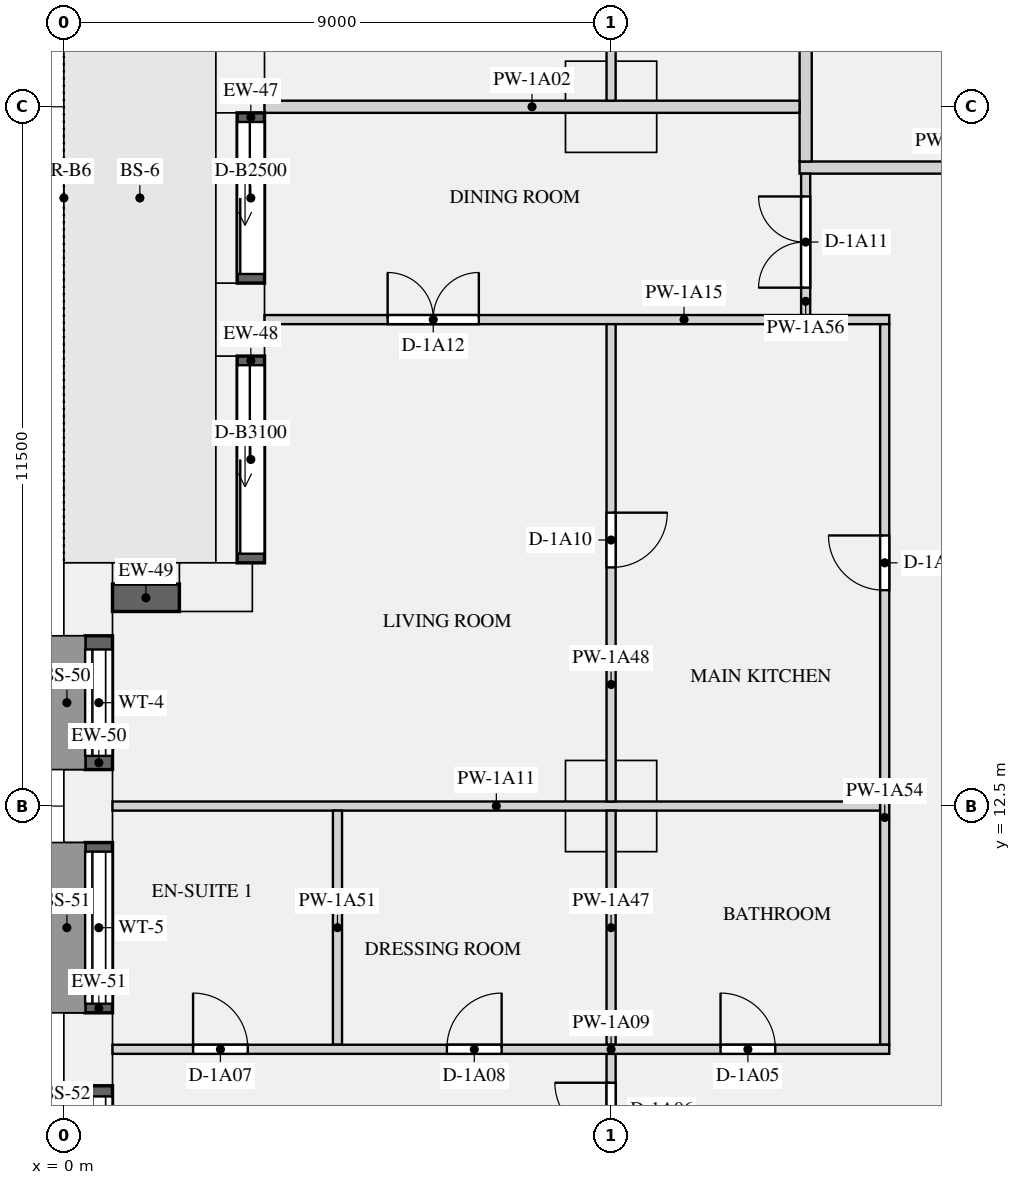
"""IFC4 building model, lengths in metres.
Left out: names, types, materials, properties, quantities, classifications, styles, units other than length and angle.
Written with IfcOpenShell. Run it as: python <this file> out.ifc"""

import sys

from ifc_helpers import new_model, si_unit, direction, frame, frame_2d, origin, origin_2d, place, context, subcontext, project, spatial, rectangle, extrude, element, fill, save


model = new_model("IFC4")
c1 = context("Model", 3, precision=1e-05, world=origin(), true_north=direction((0.0, 1.0)))
c2 = subcontext(c1, "Body", "Model", "MODEL_VIEW")
j1 = project(units=[si_unit("LENGTHUNIT", "METRE"), si_unit("PLANEANGLEUNIT", "RADIAN")], contexts=[c1])
p1 = place(None, origin())
s1 = spatial("IfcSite", under=j1, at=p1, CompositionType="ELEMENT")
p2 = place(p1, origin())
s2 = spatial("IfcBuilding", under=s1, at=p2, CompositionType="ELEMENT")
p3 = place(p2, frame((0.0, 0.0, 19.5)))
s3 = spatial("IfcBuildingStorey", under=s2, at=p3, CompositionType="ELEMENT", Elevation=19.5)
for number, where, z_axis, x_axis in (
    (1, (2.9, 24.5, -0.32), (0.0, 0.0, 1.0), (0.0, -1.0, 0.0)),
    (2, (2.9, 20.5, -0.32), (0.0, 0.0, 1.0), (0.0, -1.0, 0.0)),
):
    element("IfcColumn", number, at=place(p3, frame(where, z_axis=z_axis, x_axis=x_axis)), inside=s3, PredefinedType="USERDEFINED", context=c2, shape_type="SweptSolid", body=[
        extrude(rectangle(XDim=1.2, YDim=0.8, at=origin_2d()), origin(), (0.0, 0.0, 1.0), 3.47),
    ])
for number, where, z_axis, x_axis in (
    (3, (2.5, 16.1, 0.0), (0.0, 0.0, 1.0), (-1.0, 0.0, 0.0)),
    (4, (0.4, 15.9, 0.0), (0.0, 0.0, 1.0), (0.0, -1.0, 0.0)),
):
    element("IfcColumn", number, at=place(p3, frame(where, z_axis=z_axis, x_axis=x_axis)), inside=s3, PredefinedType="USERDEFINED", context=c2, shape_type="SweptSolid", body=[
        extrude(rectangle(XDim=1.2, YDim=0.8, at=origin_2d()), origin(), (0.0, 0.0, 1.0), 3.15),
    ])
for number, where, z_axis, x_axis in (
    (5, (0.4, 12.5, -0.32), (0.0, 0.0, 1.0), (0.0, -1.0, 0.0)),
    (6, (0.4, 8.5, -0.32), (0.0, 0.0, 1.0), (0.0, -1.0, 0.0)),
):
    element("IfcColumn", number, at=place(p3, frame(where, z_axis=z_axis, x_axis=x_axis)), inside=s3, PredefinedType="USERDEFINED", context=c2, shape_type="SweptSolid", body=[
        extrude(rectangle(XDim=1.2, YDim=0.8, at=origin_2d()), origin(), (0.0, 0.0, 1.0), 3.47),
    ])
for number, where, z_axis, x_axis in (
    (7, (9.0, 24.0, 0.0), (0.0, 0.0, 1.0), (1.0, 0.0, 0.0)),
    (8, (9.0, 12.5, 0.0), (0.0, 0.0, 1.0), (1.0, 0.0, 0.0)),
):
    element("IfcColumn", number, at=place(p3, frame(where, z_axis=z_axis, x_axis=x_axis)), inside=s3, PredefinedType="COLUMN", context=c2, shape_type="SweptSolid", body=[
        extrude(rectangle(XDim=1.5, YDim=1.5, at=origin_2d()), origin(), (0.0, 0.0, 1.0), 3.15),
    ])
p4 = place(p3, frame((3.075, 23.9, 0.0), z_axis=(0.0, 0.0, 1.0), x_axis=(0.0, -1.0, 0.0)))
e9 = element("IfcWall", 9, at=p4, inside=s3, PredefinedType="SOLIDWALL", context=c2, shape_type="SweptSolid", body=[
    extrude(rectangle(XDim=2.8, YDim=0.45, at=frame_2d((1.4, 0.0))), origin(), (0.0, 0.0, 1.0), 2.83),
])
p5 = place(p4, frame((0.15, 0.0, 0.0)))
e10 = element("IfcOpeningElement", 10, at=p5, cuts=e9, PredefinedType="OPENING", context=c2, shape_type="SweptSolid", body=[
    extrude(rectangle(XDim=2.5, YDim=2.3, at=frame_2d((1.25, 1.15))), frame((0.0, 0.235, 0.0), z_axis=(0.0, -1.0, 0.0), x_axis=(1.0, 0.0, 0.0)), (0.0, 0.0, 1.0), 0.47),
])
p6 = place(p3, frame((3.075, 19.9, 0.0), z_axis=(0.0, 0.0, 1.0), x_axis=(0.0, -1.0, 0.0)))
e11 = element("IfcWall", 11, at=p6, inside=s3, PredefinedType="SOLIDWALL", context=c2, shape_type="SweptSolid", body=[
    extrude(rectangle(XDim=3.4, YDim=0.45, at=frame_2d((1.7, 0.0))), origin(), (0.0, 0.0, 1.0), 2.83),
])
p7 = place(p6, frame((0.15, 0.0, 0.0)))
e12 = element("IfcOpeningElement", 12, at=p7, cuts=e11, PredefinedType="OPENING", context=c2, shape_type="SweptSolid", body=[
    extrude(rectangle(XDim=3.1, YDim=2.3, at=frame_2d((1.55, 1.15))), frame((0.0, 0.235, 0.0), z_axis=(0.0, -1.0, 0.0), x_axis=(1.0, 0.0, 0.0)), (0.0, 0.0, 1.0), 0.47),
])
p8 = place(p3, frame((1.9, 15.925, 0.9), z_axis=(0.0, 0.0, 1.0), x_axis=(-1.0, 0.0, 0.0)))
e13 = element("IfcWall", 13, at=p8, inside=s3, PredefinedType="SOLIDWALL", context=c2, shape_type="SweptSolid", body=[
    extrude(rectangle(XDim=1.1, YDim=0.45, at=frame_2d((0.55, 0.0))), origin(), (0.0, 0.0, 1.0), 1.93),
])
p9 = place(p3, frame((0.575, 15.3, 0.9), z_axis=(0.0, 0.0, 1.0), x_axis=(0.0, -1.0, 0.0)))
e14 = element("IfcWall", 14, at=p9, inside=s3, PredefinedType="SOLIDWALL", context=c2, shape_type="SweptSolid", body=[
    extrude(rectangle(XDim=2.2, YDim=0.45, at=frame_2d((1.1, 0.0))), origin(), (0.0, 0.0, 1.0), 1.93),
])
p10 = place(p9, frame((0.225, 0.0, 0.15)))
e15 = element("IfcOpeningElement", 15, at=p10, cuts=e14, PredefinedType="OPENING", context=c2, shape_type="SweptSolid", body=[
    extrude(rectangle(XDim=1.75, YDim=1.5, at=frame_2d((0.875, 0.75))), frame((0.0, 0.235, 0.0), z_axis=(0.0, -1.0, 0.0), x_axis=(1.0, 0.0, 0.0)), (0.0, 0.0, 1.0), 0.47),
])
p11 = place(p3, frame((0.575, 11.9, 0.9), z_axis=(0.0, 0.0, 1.0), x_axis=(0.0, -1.0, 0.0)))
e16 = element("IfcWall", 16, at=p11, inside=s3, PredefinedType="SOLIDWALL", context=c2, shape_type="SweptSolid", body=[
    extrude(rectangle(XDim=2.8, YDim=0.45, at=frame_2d((1.4, 0.0))), origin(), (0.0, 0.0, 1.0), 1.93),
])
p12 = place(p11, frame((0.15, 0.0, 0.15)))
e17 = element("IfcOpeningElement", 17, at=p12, cuts=e16, PredefinedType="OPENING", context=c2, shape_type="SweptSolid", body=[
    extrude(rectangle(XDim=2.5, YDim=1.5, at=frame_2d((1.25, 0.75))), frame((0.0, 0.235, 0.0), z_axis=(0.0, -1.0, 0.0), x_axis=(1.0, 0.0, 0.0)), (0.0, 0.0, 1.0), 0.47),
])
p13 = place(p3, frame((0.575, 7.9, 0.9), z_axis=(0.0, 0.0, 1.0), x_axis=(0.0, -1.0, 0.0)))
e18 = element("IfcWall", 18, at=p13, inside=s3, PredefinedType="SOLIDWALL", context=c2, shape_type="SweptSolid", body=[
    extrude(rectangle(XDim=2.6, YDim=0.45, at=frame_2d((1.3, 0.0))), origin(), (0.0, 0.0, 1.0), 1.93),
])
p14 = place(p13, frame((0.175, 0.0, 0.15)))
e19 = element("IfcOpeningElement", 19, at=p14, cuts=e18, PredefinedType="OPENING", context=c2, shape_type="SweptSolid", body=[
    extrude(rectangle(XDim=2.25, YDim=1.5, at=frame_2d((1.125, 0.75))), frame((0.0, 0.235, 0.0), z_axis=(0.0, -1.0, 0.0), x_axis=(1.0, 0.0, 0.0)), (0.0, 0.0, 1.0), 0.47),
])
p15 = place(p3, frame((12.1, 23.0, 0.0), z_axis=(0.0, 0.0, 1.0), x_axis=(1.0, 0.0, 0.0)))
e20 = element("IfcWall", 20, at=p15, inside=s3, PredefinedType="PARTITIONING", context=c2, shape_type="SweptSolid", body=[
    extrude(rectangle(XDim=5.0, YDim=0.2, at=frame_2d((2.5, 0.0))), origin(), (0.0, 0.0, 1.0), 2.83),
])
p16 = place(p3, frame((12.2, 23.1, 0.0), z_axis=(0.0, 0.0, 1.0), x_axis=(0.0, 1.0, 0.0)))
e21 = element("IfcWall", 21, at=p16, inside=s3, PredefinedType="PARTITIONING", context=c2, shape_type="SweptSolid", body=[
    extrude(rectangle(XDim=3.9, YDim=0.2, at=frame_2d((1.95, 0.0))), origin(), (0.0, 0.0, 1.0), 2.83),
])
p17 = place(p3, frame((3.3, 24.0, 0.0), z_axis=(0.0, 0.0, 1.0), x_axis=(1.0, 0.0, 0.0)))
e22 = element("IfcWall", 22, at=p17, inside=s3, PredefinedType="PARTITIONING", context=c2, shape_type="SweptSolid", body=[
    extrude(rectangle(XDim=8.8, YDim=0.2, at=frame_2d((4.4, 0.0))), origin(), (0.0, 0.0, 1.0), 2.83),
])
p18 = place(p3, frame((0.8, 8.5, 0.0), z_axis=(0.0, 0.0, 1.0), x_axis=(1.0, 0.0, 0.0)))
e23 = element("IfcWall", 23, at=p18, inside=s3, PredefinedType="PARTITIONING", context=c2, shape_type="SweptSolid", body=[
    extrude(rectangle(XDim=12.775, YDim=0.15, at=frame_2d((6.387, 0.0))), origin(), (0.0, 0.0, 1.0), 2.83),
])
p19 = place(p18, frame((10.0, 0.0, 0.0)))
e24 = element("IfcOpeningElement", 24, at=p19, cuts=e23, PredefinedType="OPENING", context=c2, shape_type="SweptSolid", body=[
    extrude(rectangle(XDim=0.9, YDim=2.1, at=frame_2d((0.45, 1.05))), frame((0.0, 0.085, 0.0), z_axis=(0.0, -1.0, 0.0), x_axis=(1.0, 0.0, 0.0)), (0.0, 0.0, 1.0), 0.17),
])
p20 = place(p18, frame((1.325, 0.0, 0.0)))
e25 = element("IfcOpeningElement", 25, at=p20, cuts=e23, PredefinedType="OPENING", context=c2, shape_type="SweptSolid", body=[
    extrude(rectangle(XDim=0.9, YDim=2.1, at=frame_2d((0.45, 1.05))), frame((0.0, 0.085, 0.0), z_axis=(0.0, -1.0, 0.0), x_axis=(1.0, 0.0, 0.0)), (0.0, 0.0, 1.0), 0.17),
])
p21 = place(p18, frame((5.5, 0.0, 0.0)))
e26 = element("IfcOpeningElement", 26, at=p21, cuts=e23, PredefinedType="OPENING", context=c2, shape_type="SweptSolid", body=[
    extrude(rectangle(XDim=0.9, YDim=2.1, at=frame_2d((0.45, 1.05))), frame((0.0, 0.085, 0.0), z_axis=(0.0, -1.0, 0.0), x_axis=(1.0, 0.0, 0.0)), (0.0, 0.0, 1.0), 0.17),
])
p22 = place(p3, frame((0.8, 12.5, 0.0), z_axis=(0.0, 0.0, 1.0), x_axis=(1.0, 0.0, 0.0)))
e27 = element("IfcWall", 27, at=p22, inside=s3, PredefinedType="PARTITIONING", context=c2, shape_type="SweptSolid", body=[
    extrude(rectangle(XDim=12.625, YDim=0.15, at=frame_2d((6.312, 0.0))), origin(), (0.0, 0.0, 1.0), 2.83),
])
p23 = place(p3, frame((3.3, 20.5, 0.0), z_axis=(0.0, 0.0, 1.0), x_axis=(1.0, 0.0, 0.0)))
e28 = element("IfcWall", 28, at=p23, inside=s3, PredefinedType="PARTITIONING", context=c2, shape_type="SweptSolid", body=[
    extrude(rectangle(XDim=10.275, YDim=0.15, at=frame_2d((5.137, 0.0))), origin(), (0.0, 0.0, 1.0), 2.83),
])
p24 = place(p23, frame((2.025, 0.0, 0.0)))
e29 = element("IfcOpeningElement", 29, at=p24, cuts=e28, PredefinedType="OPENING", context=c2, shape_type="SweptSolid", body=[
    extrude(rectangle(XDim=1.5, YDim=2.1, at=frame_2d((0.75, 1.05))), frame((0.0, 0.085, 0.0), z_axis=(0.0, -1.0, 0.0), x_axis=(1.0, 0.0, 0.0)), (0.0, 0.0, 1.0), 0.17),
])
p25 = place(p3, frame((9.0, 0.8, 0.0), z_axis=(0.0, 0.0, 1.0), x_axis=(0.0, 1.0, 0.0)))
e30 = element("IfcWall", 30, at=p25, inside=s3, PredefinedType="PARTITIONING", context=c2, shape_type="SweptSolid", body=[
    extrude(rectangle(XDim=7.625, YDim=0.15, at=frame_2d((3.812, 0.0))), origin(), (0.0, 0.0, 1.0), 2.83),
])
p26 = place(p25, frame((6.25, 0.0, 0.0)))
e31 = element("IfcOpeningElement", 31, at=p26, cuts=e30, PredefinedType="OPENING", context=c2, shape_type="SweptSolid", body=[
    extrude(rectangle(XDim=0.9, YDim=2.1, at=frame_2d((0.45, 1.05))), frame((0.0, 0.085, 0.0), z_axis=(0.0, -1.0, 0.0), x_axis=(1.0, 0.0, 0.0)), (0.0, 0.0, 1.0), 0.17),
])
p27 = place(p3, frame((9.0, 8.575, 0.0), z_axis=(0.0, 0.0, 1.0), x_axis=(0.0, 1.0, 0.0)))
e32 = element("IfcWall", 32, at=p27, inside=s3, PredefinedType="PARTITIONING", context=c2, shape_type="SweptSolid", body=[
    extrude(rectangle(XDim=3.85, YDim=0.15, at=frame_2d((1.925, 0.0))), origin(), (0.0, 0.0, 1.0), 2.83),
])
p28 = place(p3, frame((9.0, 12.575, 0.0), z_axis=(0.0, 0.0, 1.0), x_axis=(0.0, 1.0, 0.0)))
e33 = element("IfcWall", 33, at=p28, inside=s3, PredefinedType="PARTITIONING", context=c2, shape_type="SweptSolid", body=[
    extrude(rectangle(XDim=7.85, YDim=0.15, at=frame_2d((3.925, 0.0))), origin(), (0.0, 0.0, 1.0), 2.83),
])
p29 = place(p28, frame((3.85, 0.0, 0.0)))
e34 = element("IfcOpeningElement", 34, at=p29, cuts=e33, PredefinedType="OPENING", context=c2, shape_type="SweptSolid", body=[
    extrude(rectangle(XDim=0.9, YDim=2.1, at=frame_2d((0.45, 1.05))), frame((0.0, 0.085, 0.0), z_axis=(0.0, -1.0, 0.0), x_axis=(1.0, 0.0, 0.0)), (0.0, 0.0, 1.0), 0.17),
])
p30 = place(p3, frame((9.0, 24.1, 0.0), z_axis=(0.0, 0.0, 1.0), x_axis=(0.0, 1.0, 0.0)))
e35 = element("IfcWall", 35, at=p30, inside=s3, PredefinedType="PARTITIONING", context=c2, shape_type="SweptSolid", body=[
    extrude(rectangle(XDim=12.075, YDim=0.15, at=frame_2d((6.038, 0.0))), origin(), (0.0, 0.0, 1.0), 2.83),
])
p31 = place(p30, frame((4.012, 0.0, 0.0)))
e36 = element("IfcOpeningElement", 36, at=p31, cuts=e35, PredefinedType="OPENING", context=c2, shape_type="SweptSolid", body=[
    extrude(rectangle(XDim=0.9, YDim=2.1, at=frame_2d((0.45, 1.05))), frame((0.0, 0.085, 0.0), z_axis=(0.0, -1.0, 0.0), x_axis=(1.0, 0.0, 0.0)), (0.0, 0.0, 1.0), 0.17),
])
p32 = place(p30, frame((9.012, 0.0, 0.0)))
e37 = element("IfcOpeningElement", 37, at=p32, cuts=e35, PredefinedType="OPENING", context=c2, shape_type="SweptSolid", body=[
    extrude(rectangle(XDim=0.9, YDim=2.1, at=frame_2d((0.45, 1.05))), frame((0.0, 0.085, 0.0), z_axis=(0.0, -1.0, 0.0), x_axis=(1.0, 0.0, 0.0)), (0.0, 0.0, 1.0), 0.17),
])
p33 = place(p3, frame((4.5, 8.575, 0.0), z_axis=(0.0, 0.0, 1.0), x_axis=(0.0, 1.0, 0.0)))
e38 = element("IfcWall", 38, at=p33, inside=s3, PredefinedType="PARTITIONING", context=c2, shape_type="SweptSolid", body=[
    extrude(rectangle(XDim=3.85, YDim=0.15, at=frame_2d((1.925, 0.0))), origin(), (0.0, 0.0, 1.0), 2.83),
])
p34 = place(p3, frame((13.5, 8.575, 0.0), z_axis=(0.0, 0.0, 1.0), x_axis=(0.0, 1.0, 0.0)))
e39 = element("IfcWall", 39, at=p34, inside=s3, PredefinedType="PARTITIONING", context=c2, shape_type="SweptSolid", body=[
    extrude(rectangle(XDim=11.85, YDim=0.15, at=frame_2d((5.925, 0.0))), origin(), (0.0, 0.0, 1.0), 2.83),
])
p35 = place(p34, frame((7.475, 0.0, 0.0)))
e40 = element("IfcOpeningElement", 40, at=p35, cuts=e39, PredefinedType="OPENING", context=c2, shape_type="SweptSolid", body=[
    extrude(rectangle(XDim=0.9, YDim=2.1, at=frame_2d((0.45, 1.05))), frame((0.0, 0.085, 0.0), z_axis=(0.0, -1.0, 0.0), x_axis=(1.0, 0.0, 0.0)), (0.0, 0.0, 1.0), 0.17),
])
p36 = place(p3, frame((12.2, 20.575, 0.0), z_axis=(0.0, 0.0, 1.0), x_axis=(0.0, 1.0, 0.0)))
e41 = element("IfcWall", 41, at=p36, inside=s3, PredefinedType="PARTITIONING", context=c2, shape_type="SweptSolid", body=[
    extrude(rectangle(XDim=2.325, YDim=0.15, at=frame_2d((1.163, 0.0))), origin(), (0.0, 0.0, 1.0), 2.83),
])
p37 = place(p36, frame((0.45, 0.0, 0.0)))
e42 = element("IfcOpeningElement", 42, at=p37, cuts=e41, PredefinedType="OPENING", context=c2, shape_type="SweptSolid", body=[
    extrude(rectangle(XDim=1.5, YDim=2.1, at=frame_2d((0.75, 1.05))), frame((0.0, 0.085, 0.0), z_axis=(0.0, -1.0, 0.0), x_axis=(1.0, 0.0, 0.0)), (0.0, 0.0, 1.0), 0.17),
])
p38 = place(p5, origin())
e43 = element("IfcDoor", 43, at=p38, inside=s3, OperationType="SLIDING_TO_LEFT", PredefinedType="DOOR", context=c2, shape_type="SweptSolid", body=[
    extrude(rectangle(XDim=2.5, YDim=2.3, at=frame_2d((1.25, 1.15))), frame((0.0, -0.07, 0.0), z_axis=(0.0, -1.0, 0.0), x_axis=(1.0, 0.0, 0.0)), (0.0, 0.0, 1.0), 0.05),
])
fill(e10, e43)
p39 = place(p7, origin())
e44 = element("IfcDoor", 44, at=p39, inside=s3, OperationType="SLIDING_TO_LEFT", PredefinedType="DOOR", context=c2, shape_type="SweptSolid", body=[
    extrude(rectangle(XDim=3.1, YDim=2.3, at=frame_2d((1.55, 1.15))), frame((0.0, -0.07, 0.0), z_axis=(0.0, -1.0, 0.0), x_axis=(1.0, 0.0, 0.0)), (0.0, 0.0, 1.0), 0.05),
])
fill(e12, e44)
p40 = place(p10, origin())
e45 = element("IfcWindow", 45, at=p40, inside=s3, PartitioningType="SINGLE_PANEL", PredefinedType="WINDOW", context=c2, shape_type="SweptSolid", body=[
    extrude(rectangle(XDim=1.75, YDim=1.5, at=frame_2d((0.875, 0.75))), frame((0.0, -0.065, 0.0), z_axis=(0.0, -1.0, 0.0), x_axis=(1.0, 0.0, 0.0)), (0.0, 0.0, 1.0), 0.06),
])
fill(e15, e45)
p41 = place(p12, origin())
e46 = element("IfcWindow", 46, at=p41, inside=s3, PartitioningType="SINGLE_PANEL", PredefinedType="WINDOW", context=c2, shape_type="SweptSolid", body=[
    extrude(rectangle(XDim=2.5, YDim=1.5, at=frame_2d((1.25, 0.75))), frame((0.0, -0.065, 0.0), z_axis=(0.0, -1.0, 0.0), x_axis=(1.0, 0.0, 0.0)), (0.0, 0.0, 1.0), 0.06),
])
fill(e17, e46)
p42 = place(p14, origin())
e47 = element("IfcWindow", 47, at=p42, inside=s3, PartitioningType="SINGLE_PANEL", PredefinedType="WINDOW", context=c2, shape_type="SweptSolid", body=[
    extrude(rectangle(XDim=2.25, YDim=1.5, at=frame_2d((1.125, 0.75))), frame((0.0, -0.065, 0.0), z_axis=(0.0, -1.0, 0.0), x_axis=(1.0, 0.0, 0.0)), (0.0, 0.0, 1.0), 0.06),
])
fill(e19, e47)
p43 = place(p19, origin())
e48 = element("IfcDoor", 48, at=p43, inside=s3, OperationType="SINGLE_SWING_LEFT", PredefinedType="DOOR", context=c2, shape_type="SweptSolid", body=[
    extrude(rectangle(XDim=0.9, YDim=2.1, at=frame_2d((0.45, 1.05))), frame((0.0, 0.025, 0.0), z_axis=(0.0, -1.0, 0.0), x_axis=(1.0, 0.0, 0.0)), (0.0, 0.0, 1.0), 0.05),
])
fill(e24, e48)
p44 = place(p26, origin())
e49 = element("IfcDoor", 49, at=p44, inside=s3, OperationType="SINGLE_SWING_RIGHT", PredefinedType="DOOR", context=c2, shape_type="SweptSolid", body=[
    extrude(rectangle(XDim=0.9, YDim=2.1, at=frame_2d((0.45, 1.05))), frame((0.0, 0.025, 0.0), z_axis=(0.0, -1.0, 0.0), x_axis=(1.0, 0.0, 0.0)), (0.0, 0.0, 1.0), 0.05),
])
fill(e31, e49)
p45 = place(p20, origin())
e50 = element("IfcDoor", 50, at=p45, inside=s3, OperationType="SINGLE_SWING_LEFT", PredefinedType="DOOR", context=c2, shape_type="SweptSolid", body=[
    extrude(rectangle(XDim=0.9, YDim=2.1, at=frame_2d((0.45, 1.05))), frame((0.0, 0.025, 0.0), z_axis=(0.0, -1.0, 0.0), x_axis=(1.0, 0.0, 0.0)), (0.0, 0.0, 1.0), 0.05),
])
fill(e25, e50)
p46 = place(p21, origin())
e51 = element("IfcDoor", 51, at=p46, inside=s3, OperationType="SINGLE_SWING_RIGHT", PredefinedType="DOOR", context=c2, shape_type="SweptSolid", body=[
    extrude(rectangle(XDim=0.9, YDim=2.1, at=frame_2d((0.45, 1.05))), frame((0.0, 0.025, 0.0), z_axis=(0.0, -1.0, 0.0), x_axis=(1.0, 0.0, 0.0)), (0.0, 0.0, 1.0), 0.05),
])
fill(e26, e51)
p47 = place(p35, origin())
e52 = element("IfcDoor", 52, at=p47, inside=s3, OperationType="SINGLE_SWING_RIGHT", PredefinedType="DOOR", context=c2, shape_type="SweptSolid", body=[
    extrude(rectangle(XDim=0.9, YDim=2.1, at=frame_2d((0.45, 1.05))), frame((0.0, 0.025, 0.0), z_axis=(0.0, -1.0, 0.0), x_axis=(1.0, 0.0, 0.0)), (0.0, 0.0, 1.0), 0.05),
])
fill(e40, e52)
p48 = place(p29, frame((0.9, 0.0, 0.0), z_axis=(0.0, 0.0, 1.0), x_axis=(-1.0, 0.0, 0.0)))
e53 = element("IfcDoor", 53, at=p48, inside=s3, OperationType="SINGLE_SWING_LEFT", PredefinedType="DOOR", context=c2, shape_type="SweptSolid", body=[
    extrude(rectangle(XDim=0.9, YDim=2.1, at=frame_2d((0.45, 1.05))), frame((0.0, 0.025, 0.0), z_axis=(0.0, -1.0, 0.0), x_axis=(1.0, 0.0, 0.0)), (0.0, 0.0, 1.0), 0.05),
])
fill(e34, e53)
p49 = place(p37, origin())
e54 = element("IfcDoor", 54, at=p49, inside=s3, OperationType="DOUBLE_DOOR_SINGLE_SWING", PredefinedType="DOOR", context=c2, shape_type="SweptSolid", body=[
    extrude(rectangle(XDim=1.5, YDim=2.1, at=frame_2d((0.75, 1.05))), frame((0.0, 0.025, 0.0), z_axis=(0.0, -1.0, 0.0), x_axis=(1.0, 0.0, 0.0)), (0.0, 0.0, 1.0), 0.05),
])
fill(e42, e54)
p50 = place(p24, origin())
e55 = element("IfcDoor", 55, at=p50, inside=s3, OperationType="DOUBLE_DOOR_SINGLE_SWING", PredefinedType="DOOR", context=c2, shape_type="SweptSolid", body=[
    extrude(rectangle(XDim=1.5, YDim=2.1, at=frame_2d((0.75, 1.05))), frame((0.0, 0.025, 0.0), z_axis=(0.0, -1.0, 0.0), x_axis=(1.0, 0.0, 0.0)), (0.0, 0.0, 1.0), 0.05),
])
fill(e29, e55)
save(model, sys.argv[1])
